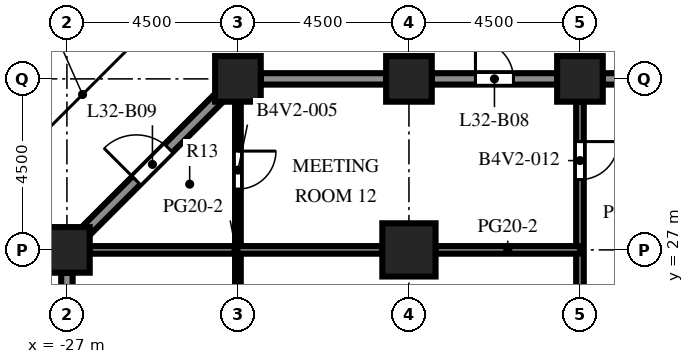
"""IFC4 building model, lengths in metres.
Left out: names, types, materials, properties, quantities, classifications, styles, units other than length and angle.
Written with IfcOpenShell. Run it as: python <this file> out.ifc"""

import sys

from ifc_helpers import new_model, si_unit, direction, frame, frame_2d, origin, origin_2d, place, context, subcontext, project, spatial, rectangle, extrude, element, fill, save


model = new_model("IFC4")
c1 = context("Model", 3, precision=1e-05, world=origin(), true_north=direction((0.0, 1.0)))
c2 = subcontext(c1, "Body", "Model", "MODEL_VIEW")
j1 = project(units=[si_unit("LENGTHUNIT", "METRE"), si_unit("PLANEANGLEUNIT", "RADIAN")], contexts=[c1])
p1 = place(None, origin())
s1 = spatial("IfcSite", under=j1, at=p1, CompositionType="ELEMENT")
p2 = place(p1, origin())
s2 = spatial("IfcBuilding", under=s1, at=p2, CompositionType="ELEMENT")
p3 = place(p2, frame((0.0, 0.0, 141.3)))
s3 = spatial("IfcBuildingStorey", under=s2, at=p3, CompositionType="ELEMENT", Elevation=141.3)
for number, where, z_axis, x_axis in (
    (1, (-27.0, 27.0, 0.0), (0.0, 0.0, 1.0), (1.0, 0.0, 0.0)),
    (2, (-22.5, 31.5, 0.0), (0.0, 0.0, 1.0), (1.0, 0.0, 0.0)),
    (3, (-18.0, 31.5, 0.0), (0.0, 0.0, 1.0), (1.0, 0.0, 0.0)),
    (4, (-13.5, 31.5, 0.0), (0.0, 0.0, 1.0), (1.0, 0.0, 0.0)),
):
    element("IfcColumn", number, at=place(p3, frame(where, z_axis=z_axis, x_axis=x_axis)), inside=s3, PredefinedType="COLUMN", context=c2, shape_type="SweptSolid", body=[
        extrude(rectangle(XDim=1.2, YDim=1.2, at=origin_2d()), origin(), (0.0, 0.0, 1.0), 4.1),
    ])
p4 = place(p3, frame((-18.0, 27.0, 0.0), z_axis=(0.0, 0.0, 1.0), x_axis=(1.0, 0.0, 0.0)))
e5 = element("IfcColumn", 5, at=p4, inside=s3, PredefinedType="COLUMN", context=c2, shape_type="SweptSolid", body=[
    extrude(rectangle(XDim=1.4, YDim=1.4, at=origin_2d()), origin(), (0.0, 0.0, 1.0), 4.1),
])
p5 = place(p3, frame((-12.9, 31.5, 0.0), z_axis=(0.0, 0.0, 1.0), x_axis=(1.0, 0.0, 0.0)))
e6 = element("IfcWall", 6, at=p5, inside=s3, PredefinedType="SOLIDWALL", context=c2, shape_type="SweptSolid", body=[
    extrude(rectangle(XDim=3.3, YDim=0.3, at=frame_2d((1.65, 0.0))), origin(), (0.0, 0.0, 1.0), 2.6),
])
p6 = place(p3, frame((-17.4, 31.5, 0.0), z_axis=(0.0, 0.0, 1.0), x_axis=(1.0, 0.0, 0.0)))
e7 = element("IfcWall", 7, at=p6, inside=s3, PredefinedType="SOLIDWALL", context=c2, shape_type="SweptSolid", body=[
    extrude(rectangle(XDim=3.3, YDim=0.3, at=frame_2d((1.65, 0.0))), origin(), (0.0, 0.0, 1.0), 2.6),
])
p7 = place(p6, frame((1.15, 0.0, 0.0)))
e8 = element("IfcOpeningElement", 8, at=p7, cuts=e7, PredefinedType="OPENING", context=c2, shape_type="SweptSolid", body=[
    extrude(rectangle(XDim=1.0, YDim=2.2, at=frame_2d((0.5, 1.1))), frame((0.0, 0.16, 0.0), z_axis=(0.0, -1.0, 0.0), x_axis=(1.0, 0.0, 0.0)), (0.0, 0.0, 1.0), 0.32),
])
p8 = place(p3, frame((-21.9, 31.5, 0.0), z_axis=(0.0, 0.0, 1.0), x_axis=(1.0, 0.0, 0.0)))
e9 = element("IfcWall", 9, at=p8, inside=s3, PredefinedType="SOLIDWALL", context=c2, shape_type="SweptSolid", body=[
    extrude(rectangle(XDim=3.3, YDim=0.3, at=frame_2d((1.65, 0.0))), origin(), (0.0, 0.0, 1.0), 2.6),
])
p9 = place(p3, frame((-26.506, 27.494, 0.0), z_axis=(0.0, 0.0, 1.0), x_axis=(0.707106781187, 0.707106781187, 0.0)))
e10 = element("IfcWall", 10, at=p9, inside=s3, PredefinedType="SOLIDWALL", context=c2, shape_type="SweptSolid", body=[
    extrude(rectangle(XDim=4.967, YDim=0.3, at=frame_2d((2.483, 0.0))), origin(), (0.0, 0.0, 1.0), 2.6),
])
p10 = place(p9, frame((1.884, 0.0, 0.0)))
e11 = element("IfcOpeningElement", 11, at=p10, cuts=e10, PredefinedType="OPENING", context=c2, shape_type="SweptSolid", body=[
    extrude(rectangle(XDim=1.2, YDim=2.2, at=frame_2d((0.6, 1.1))), frame((0.0, 0.16, 0.0), z_axis=(0.0, -1.0, 0.0), x_axis=(1.0, 0.0, 0.0)), (0.0, 0.0, 1.0), 0.32),
])
p11 = place(p3, frame((-27.0, 23.1, 0.0), z_axis=(0.0, 0.0, 1.0), x_axis=(0.0, 1.0, 0.0)))
e12 = element("IfcWall", 12, at=p11, inside=s3, PredefinedType="SOLIDWALL", context=c2, shape_type="SweptSolid", body=[
    extrude(rectangle(XDim=3.3, YDim=0.3, at=frame_2d((1.65, 0.0))), origin(), (0.0, 0.0, 1.0), 2.6),
])
p12 = place(p3, frame((-22.5, -21.9, 0.0), z_axis=(0.0, 0.0, 1.0), x_axis=(0.0, 1.0, 0.0)))
e13 = element("IfcWall", 13, at=p12, inside=s3, PredefinedType="PARTITIONING", context=c2, shape_type="SweptSolid", body=[
    extrude(rectangle(XDim=52.8, YDim=0.15, at=frame_2d((26.4, 0.0))), origin(), (0.0, 0.0, 1.0), 3.5),
])
p13 = place(p12, frame((5.75, 0.0, 0.0)))
e14 = element("IfcOpeningElement", 14, at=p13, cuts=e13, PredefinedType="OPENING", context=c2, shape_type="SweptSolid", body=[
    extrude(rectangle(XDim=1.0, YDim=2.1, at=frame_2d((0.5, 1.05))), frame((0.0, 0.085, 0.0), z_axis=(0.0, -1.0, 0.0), x_axis=(1.0, 0.0, 0.0)), (0.0, 0.0, 1.0), 0.17),
])
p14 = place(p12, frame((17.0, 0.0, 0.0)))
e15 = element("IfcOpeningElement", 15, at=p14, cuts=e13, PredefinedType="OPENING", context=c2, shape_type="SweptSolid", body=[
    extrude(rectangle(XDim=1.0, YDim=2.1, at=frame_2d((0.5, 1.05))), frame((0.0, 0.085, 0.0), z_axis=(0.0, -1.0, 0.0), x_axis=(1.0, 0.0, 0.0)), (0.0, 0.0, 1.0), 0.17),
])
p15 = place(p12, frame((29.75, 0.0, 0.0)))
e16 = element("IfcOpeningElement", 16, at=p15, cuts=e13, PredefinedType="OPENING", context=c2, shape_type="SweptSolid", body=[
    extrude(rectangle(XDim=1.0, YDim=2.1, at=frame_2d((0.5, 1.05))), frame((0.0, 0.085, 0.0), z_axis=(0.0, -1.0, 0.0), x_axis=(1.0, 0.0, 0.0)), (0.0, 0.0, 1.0), 0.17),
])
p16 = place(p12, frame((43.0, 0.0, 0.0)))
e17 = element("IfcOpeningElement", 17, at=p16, cuts=e13, PredefinedType="OPENING", context=c2, shape_type="SweptSolid", body=[
    extrude(rectangle(XDim=1.0, YDim=2.1, at=frame_2d((0.5, 1.05))), frame((0.0, 0.085, 0.0), z_axis=(0.0, -1.0, 0.0), x_axis=(1.0, 0.0, 0.0)), (0.0, 0.0, 1.0), 0.17),
])
p17 = place(p12, frame((50.5, 0.0, 0.0)))
e18 = element("IfcOpeningElement", 18, at=p17, cuts=e13, PredefinedType="OPENING", context=c2, shape_type="SweptSolid", body=[
    extrude(rectangle(XDim=1.0, YDim=2.1, at=frame_2d((0.5, 1.05))), frame((0.0, 0.085, 0.0), z_axis=(0.0, -1.0, 0.0), x_axis=(1.0, 0.0, 0.0)), (0.0, 0.0, 1.0), 0.17),
])
p18 = place(p3, frame((-13.5, -21.9, 0.0), z_axis=(0.0, 0.0, 1.0), x_axis=(0.0, 1.0, 0.0)))
e19 = element("IfcWall", 19, at=p18, inside=s3, PredefinedType="PARTITIONING", context=c2, shape_type="SweptSolid", body=[
    extrude(rectangle(XDim=52.8, YDim=0.2, at=frame_2d((26.4, 0.0))), origin(), (0.0, 0.0, 1.0), 3.5),
])
p19 = place(p18, frame((7.0, 0.0, 0.0)))
e20 = element("IfcOpeningElement", 20, at=p19, cuts=e19, PredefinedType="OPENING", context=c2, shape_type="SweptSolid", body=[
    extrude(rectangle(XDim=1.0, YDim=2.1, at=frame_2d((0.5, 1.05))), frame((0.0, 0.11, 0.0), z_axis=(0.0, -1.0, 0.0), x_axis=(1.0, 0.0, 0.0)), (0.0, 0.0, 1.0), 0.22),
])
p20 = place(p18, frame((19.75, 0.0, 0.0)))
e21 = element("IfcOpeningElement", 21, at=p20, cuts=e19, PredefinedType="OPENING", context=c2, shape_type="SweptSolid", body=[
    extrude(rectangle(XDim=1.0, YDim=2.1, at=frame_2d((0.5, 1.05))), frame((0.0, 0.11, 0.0), z_axis=(0.0, -1.0, 0.0), x_axis=(1.0, 0.0, 0.0)), (0.0, 0.0, 1.0), 0.22),
])
p21 = place(p18, frame((30.5, 0.0, 0.0)))
e22 = element("IfcOpeningElement", 22, at=p21, cuts=e19, PredefinedType="OPENING", context=c2, shape_type="SweptSolid", body=[
    extrude(rectangle(XDim=1.0, YDim=2.1, at=frame_2d((0.5, 1.05))), frame((0.0, 0.11, 0.0), z_axis=(0.0, -1.0, 0.0), x_axis=(1.0, 0.0, 0.0)), (0.0, 0.0, 1.0), 0.22),
])
p22 = place(p18, frame((43.25, 0.0, 0.0)))
e23 = element("IfcOpeningElement", 23, at=p22, cuts=e19, PredefinedType="OPENING", context=c2, shape_type="SweptSolid", body=[
    extrude(rectangle(XDim=1.0, YDim=2.1, at=frame_2d((0.5, 1.05))), frame((0.0, 0.11, 0.0), z_axis=(0.0, -1.0, 0.0), x_axis=(1.0, 0.0, 0.0)), (0.0, 0.0, 1.0), 0.22),
])
p23 = place(p18, frame((50.75, 0.0, 0.0)))
e24 = element("IfcOpeningElement", 24, at=p23, cuts=e19, PredefinedType="OPENING", context=c2, shape_type="SweptSolid", body=[
    extrude(rectangle(XDim=1.0, YDim=2.1, at=frame_2d((0.5, 1.05))), frame((0.0, 0.11, 0.0), z_axis=(0.0, -1.0, 0.0), x_axis=(1.0, 0.0, 0.0)), (0.0, 0.0, 1.0), 0.22),
])
p24 = place(p3, frame((-26.4, 27.0, 0.0), z_axis=(0.0, 0.0, 1.0), x_axis=(1.0, 0.0, 0.0)))
e25 = element("IfcWall", 25, at=p24, inside=s3, PredefinedType="PARTITIONING", context=c2, shape_type="SweptSolid", body=[
    extrude(rectangle(XDim=7.7, YDim=0.2, at=frame_2d((3.85, 0.0))), origin(), (0.0, 0.0, 1.0), 3.5),
])
p25 = place(p3, frame((-17.3, 27.0, 0.0), z_axis=(0.0, 0.0, 1.0), x_axis=(1.0, 0.0, 0.0)))
e26 = element("IfcWall", 26, at=p25, inside=s3, PredefinedType="PARTITIONING", context=c2, shape_type="SweptSolid", body=[
    extrude(rectangle(XDim=3.8, YDim=0.2, at=frame_2d((1.9, 0.0))), origin(), (0.0, 0.0, 1.0), 3.5),
])
p26 = place(p7, origin())
e27 = element("IfcDoor", 27, at=p26, inside=s3, OperationType="SINGLE_SWING_LEFT", PredefinedType="DOOR", context=c2, shape_type="SweptSolid", body=[
    extrude(rectangle(XDim=1.0, YDim=2.2, at=frame_2d((0.5, 1.1))), frame((0.0, 0.025, 0.0), z_axis=(0.0, -1.0, 0.0), x_axis=(1.0, 0.0, 0.0)), (0.0, 0.0, 1.0), 0.05),
])
fill(e8, e27)
p27 = place(p10, origin())
e28 = element("IfcDoor", 28, at=p27, inside=s3, OperationType="SINGLE_SWING_LEFT", PredefinedType="DOOR", context=c2, shape_type="SweptSolid", body=[
    extrude(rectangle(XDim=1.2, YDim=2.2, at=frame_2d((0.6, 1.1))), frame((0.0, 0.025, 0.0), z_axis=(0.0, -1.0, 0.0), x_axis=(1.0, 0.0, 0.0)), (0.0, 0.0, 1.0), 0.05),
])
fill(e11, e28)
p28 = place(p17, origin())
e29 = element("IfcDoor", 29, at=p28, inside=s3, OperationType="SINGLE_SWING_RIGHT", PredefinedType="DOOR", context=c2, shape_type="SweptSolid", body=[
    extrude(rectangle(XDim=1.0, YDim=2.1, at=frame_2d((0.5, 1.05))), frame((0.0, 0.025, 0.0), z_axis=(0.0, -1.0, 0.0), x_axis=(1.0, 0.0, 0.0)), (0.0, 0.0, 1.0), 0.05),
])
fill(e18, e29)
p29 = place(p23, origin())
e30 = element("IfcDoor", 30, at=p29, inside=s3, OperationType="SINGLE_SWING_RIGHT", PredefinedType="DOOR", context=c2, shape_type="SweptSolid", body=[
    extrude(rectangle(XDim=1.0, YDim=2.1, at=frame_2d((0.5, 1.05))), frame((0.0, 0.025, 0.0), z_axis=(0.0, -1.0, 0.0), x_axis=(1.0, 0.0, 0.0)), (0.0, 0.0, 1.0), 0.05),
])
fill(e24, e30)
save(model, sys.argv[1])
